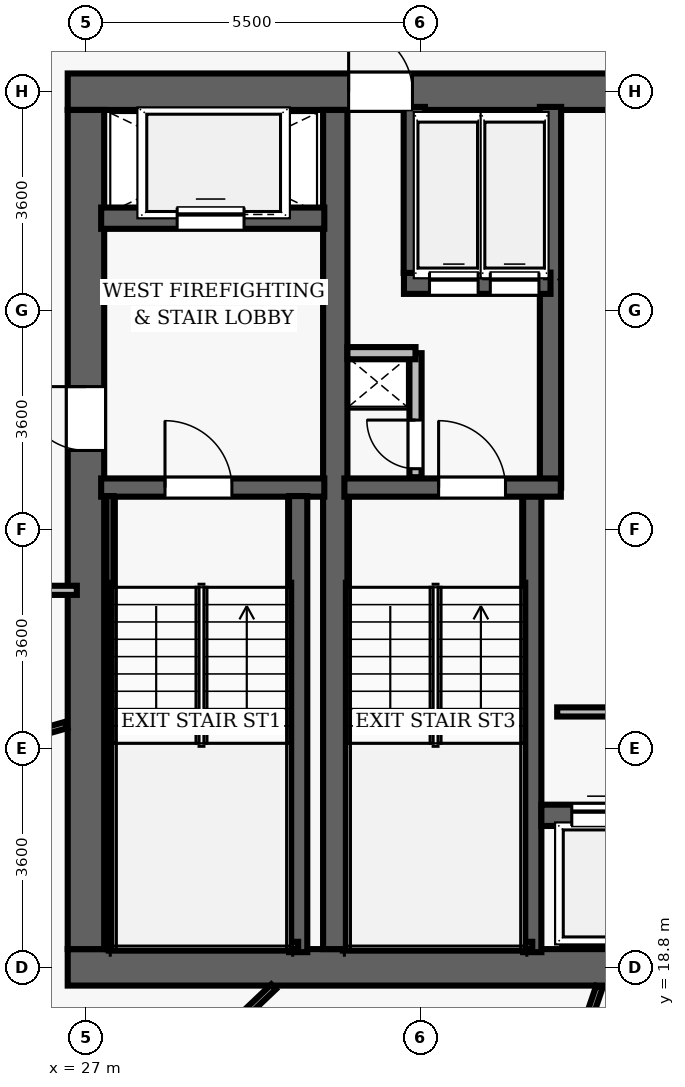
"""IFC4 building model, lengths in metres.
Left out: names, types, materials, properties, quantities, classifications, styles, units other than length and angle.
Written with IfcOpenShell. Run it as: python <this file> out.ifc"""

import sys

from ifc_helpers import new_model, si_unit, direction, frame, frame_2d, origin, place, context, subcontext, project, spatial, rectangle, extrude, element, fill, save


model = new_model("IFC4")
c1 = context("Model", 3, precision=1e-05, world=origin(), true_north=direction((0.0, 1.0)))
c2 = subcontext(c1, "Body", "Model", "MODEL_VIEW")
j1 = project(units=[si_unit("LENGTHUNIT", "METRE"), si_unit("PLANEANGLEUNIT", "RADIAN")], contexts=[c1])
p1 = place(None, origin())
s1 = spatial("IfcSite", under=j1, at=p1, CompositionType="ELEMENT")
p2 = place(p1, origin())
s2 = spatial("IfcBuilding", under=s1, at=p2, CompositionType="ELEMENT")
p3 = place(p2, frame((0.0, 0.0, 120.3)))
s3 = spatial("IfcBuildingStorey", under=s2, at=p3, CompositionType="ELEMENT", Elevation=120.3)
p4 = place(p3, frame((26.7, 18.8, 0.0), z_axis=(0.0, 0.0, 1.0), x_axis=(1.0, 0.0, 0.0)))
e1 = element("IfcWall", 1, at=p4, inside=s3, PredefinedType="SHEAR", context=c2, shape_type="SweptSolid", body=[
    extrude(rectangle(XDim=22.6, YDim=0.6, at=frame_2d((11.3, 0.0))), origin(), (0.0, 0.0, 1.0), 3.5),
])
p5 = place(p4, frame((14.52, 0.0, 0.0)))
e2 = element("IfcOpeningElement", 2, at=p5, cuts=e1, PredefinedType="OPENING", context=c2, shape_type="SweptSolid", body=[
    extrude(rectangle(XDim=1.05, YDim=2.15, at=frame_2d((0.525, 1.075))), frame((0.0, 0.31, 0.0), z_axis=(0.0, -1.0, 0.0), x_axis=(1.0, 0.0, 0.0)), (0.0, 0.0, 1.0), 0.62),
])
p6 = place(p3, frame((26.7, 33.2, 0.0), z_axis=(0.0, 0.0, 1.0), x_axis=(1.0, 0.0, 0.0)))
e3 = element("IfcWall", 3, at=p6, inside=s3, PredefinedType="SHEAR", context=c2, shape_type="SweptSolid", body=[
    extrude(rectangle(XDim=22.6, YDim=0.6, at=frame_2d((11.3, 0.0))), origin(), (0.0, 0.0, 1.0), 3.5),
])
p7 = place(p6, frame((4.62, 0.0, 0.0)))
e4 = element("IfcOpeningElement", 4, at=p7, cuts=e3, PredefinedType="OPENING", context=c2, shape_type="SweptSolid", body=[
    extrude(rectangle(XDim=1.05, YDim=2.15, at=frame_2d((0.525, 1.075))), frame((0.0, 0.31, 0.0), z_axis=(0.0, -1.0, 0.0), x_axis=(1.0, 0.0, 0.0)), (0.0, 0.0, 1.0), 0.62),
])
p8 = place(p6, frame((14.52, 0.0, 0.0)))
e5 = element("IfcOpeningElement", 5, at=p8, cuts=e3, PredefinedType="OPENING", context=c2, shape_type="SweptSolid", body=[
    extrude(rectangle(XDim=1.05, YDim=2.15, at=frame_2d((0.525, 1.075))), frame((0.0, 0.31, 0.0), z_axis=(0.0, -1.0, 0.0), x_axis=(1.0, 0.0, 0.0)), (0.0, 0.0, 1.0), 0.62),
])
p9 = place(p3, frame((27.0, 19.1, 0.0), z_axis=(0.0, 0.0, 1.0), x_axis=(0.0, 1.0, 0.0)))
e6 = element("IfcWall", 6, at=p9, inside=s3, PredefinedType="SHEAR", context=c2, shape_type="SweptSolid", body=[
    extrude(rectangle(XDim=13.8, YDim=0.6, at=frame_2d((6.9, 0.0))), origin(), (0.0, 0.0, 1.0), 3.5),
])
p10 = place(p9, frame((8.2, 0.0, 0.0)))
e7 = element("IfcOpeningElement", 7, at=p10, cuts=e6, PredefinedType="OPENING", context=c2, shape_type="SweptSolid", body=[
    extrude(rectangle(XDim=1.05, YDim=2.15, at=frame_2d((0.525, 1.075))), frame((0.0, 0.31, 0.0), z_axis=(0.0, -1.0, 0.0), x_axis=(1.0, 0.0, 0.0)), (0.0, 0.0, 1.0), 0.62),
])
p11 = place(p3, frame((31.1, 19.1, 0.0), z_axis=(0.0, 0.0, 1.0), x_axis=(0.0, 1.0, 0.0)))
e8 = element("IfcWall", 8, at=p11, inside=s3, PredefinedType="SHEAR", context=c2, shape_type="SweptSolid", body=[
    extrude(rectangle(XDim=13.8, YDim=0.4, at=frame_2d((6.9, 0.0))), origin(), (0.0, 0.0, 1.0), 3.5),
])
p12 = place(p3, frame((27.25, 26.69, 0.0), z_axis=(0.0, 0.0, 1.0), x_axis=(1.0, 0.0, 0.0)))
e9 = element("IfcWall", 9, at=p12, inside=s3, PredefinedType="SHEAR", context=c2, shape_type="SweptSolid", body=[
    extrude(rectangle(XDim=3.67, YDim=0.3, at=frame_2d((1.835, 0.0))), origin(), (0.0, 0.0, 1.0), 3.5),
])
p13 = place(p12, frame((1.05, 0.0, 0.0)))
e10 = element("IfcOpeningElement", 10, at=p13, cuts=e9, PredefinedType="OPENING", context=c2, shape_type="SweptSolid", body=[
    extrude(rectangle(XDim=1.1, YDim=2.15, at=frame_2d((0.55, 1.075))), frame((0.0, 0.16, 0.0), z_axis=(0.0, -1.0, 0.0), x_axis=(1.0, 0.0, 0.0)), (0.0, 0.0, 1.0), 0.32),
])
p14 = place(p3, frame((30.49, 19.05, 0.0), z_axis=(0.0, 0.0, 1.0), x_axis=(0.0, 1.0, 0.0)))
e11 = element("IfcWall", 11, at=p14, inside=s3, PredefinedType="SHEAR", context=c2, shape_type="SweptSolid", body=[
    extrude(rectangle(XDim=7.5, YDim=0.3, at=frame_2d((3.75, 0.0))), origin(), (0.0, 0.0, 1.0), 3.5),
])
p15 = place(p3, frame((27.395, 19.1, 0.0), z_axis=(0.0, 0.0, 1.0), x_axis=(0.0, 1.0, 0.0)))
e12 = element("IfcWall", 12, at=p15, inside=s3, PredefinedType="SHEAR", context=c2, shape_type="SweptSolid", body=[
    extrude(rectangle(XDim=7.45, YDim=0.12, at=frame_2d((3.725, 0.0))), origin(), (0.0, 0.0, 1.0), 3.5),
])
p16 = place(p3, frame((27.395, 19.16, 0.0), z_axis=(0.0, 0.0, 1.0), x_axis=(1.0, 0.0, 0.0)))
e13 = element("IfcWall", 13, at=p16, inside=s3, PredefinedType="SHEAR", context=c2, shape_type="SweptSolid", body=[
    extrude(rectangle(XDim=3.095, YDim=0.12, at=frame_2d((1.547, 0.0))), origin(), (0.0, 0.0, 1.0), 3.5),
])
p17 = place(p3, frame((27.25, 31.12, 0.0), z_axis=(0.0, 0.0, 1.0), x_axis=(1.0, 0.0, 0.0)))
e14 = element("IfcWall", 14, at=p17, inside=s3, PredefinedType="SHEAR", context=c2, shape_type="SweptSolid", body=[
    extrude(rectangle(XDim=3.67, YDim=0.35, at=frame_2d((1.835, 0.0))), origin(), (0.0, 0.0, 1.0), 2.675),
])
p18 = place(p17, frame((1.25, 0.0, 0.0)))
e15 = element("IfcOpeningElement", 15, at=p18, cuts=e14, PredefinedType="OPENING", context=c2, shape_type="SweptSolid", body=[
    extrude(rectangle(XDim=1.1, YDim=2.15, at=frame_2d((0.55, 1.075))), frame((0.0, 0.185, 0.0), z_axis=(0.0, -1.0, 0.0), x_axis=(1.0, 0.0, 0.0)), (0.0, 0.0, 1.0), 0.37),
])
p19 = place(p3, frame((34.34, 19.05, 0.0), z_axis=(0.0, 0.0, 1.0), x_axis=(0.0, 1.0, 0.0)))
e16 = element("IfcWall", 16, at=p19, inside=s3, PredefinedType="SHEAR", context=c2, shape_type="SweptSolid", body=[
    extrude(rectangle(XDim=7.5, YDim=0.3, at=frame_2d((3.75, 0.0))), origin(), (0.0, 0.0, 1.0), 3.5),
])
p20 = place(p3, frame((34.64, 26.69, 0.0), z_axis=(0.0, 0.0, 1.0), x_axis=(0.0, 1.0, 0.0)))
e17 = element("IfcWall", 17, at=p20, inside=s3, PredefinedType="SHEAR", context=c2, shape_type="SweptSolid", body=[
    extrude(rectangle(XDim=6.26, YDim=0.35, at=frame_2d((3.13, 0.0))), origin(), (0.0, 0.0, 1.0), 3.5),
])
p21 = place(p3, frame((31.25, 26.69, 0.0), z_axis=(0.0, 0.0, 1.0), x_axis=(1.0, 0.0, 0.0)))
e18 = element("IfcWall", 18, at=p21, inside=s3, PredefinedType="SHEAR", context=c2, shape_type="SweptSolid", body=[
    extrude(rectangle(XDim=3.56, YDim=0.3, at=frame_2d((1.78, 0.0))), origin(), (0.0, 0.0, 1.0), 3.5),
])
p22 = place(p21, frame((1.55, 0.0, 0.0)))
e19 = element("IfcOpeningElement", 19, at=p22, cuts=e18, PredefinedType="OPENING", context=c2, shape_type="SweptSolid", body=[
    extrude(rectangle(XDim=1.1, YDim=2.15, at=frame_2d((0.55, 1.075))), frame((0.0, 0.16, 0.0), z_axis=(0.0, -1.0, 0.0), x_axis=(1.0, 0.0, 0.0)), (0.0, 0.0, 1.0), 0.32),
])
p23 = place(p3, frame((31.3, 19.16, 0.0), z_axis=(0.0, 0.0, 1.0), x_axis=(1.0, 0.0, 0.0)))
e20 = element("IfcWall", 20, at=p23, inside=s3, PredefinedType="SHEAR", context=c2, shape_type="SweptSolid", body=[
    extrude(rectangle(XDim=3.04, YDim=0.12, at=frame_2d((1.52, 0.0))), origin(), (0.0, 0.0, 1.0), 3.5),
])
p24 = place(p3, frame((32.23, 30.05, 0.0), z_axis=(0.0, 0.0, 1.0), x_axis=(1.0, 0.0, 0.0)))
e21 = element("IfcWall", 21, at=p24, inside=s3, PredefinedType="SHEAR", context=c2, shape_type="SweptSolid", body=[
    extrude(rectangle(XDim=2.41, YDim=0.35, at=frame_2d((1.205, 0.0))), origin(), (0.0, 0.0, 1.0), 2.675),
])
p25 = place(p24, frame((0.42, 0.0, 0.0)))
e22 = element("IfcOpeningElement", 22, at=p25, cuts=e21, PredefinedType="OPENING", context=c2, shape_type="SweptSolid", body=[
    extrude(rectangle(XDim=0.8, YDim=2.15, at=frame_2d((0.4, 1.075))), frame((0.0, 0.185, 0.0), z_axis=(0.0, -1.0, 0.0), x_axis=(1.0, 0.0, 0.0)), (0.0, 0.0, 1.0), 0.37),
])
p26 = place(p24, frame((1.42, 0.0, 0.0)))
e23 = element("IfcOpeningElement", 23, at=p26, cuts=e21, PredefinedType="OPENING", context=c2, shape_type="SweptSolid", body=[
    extrude(rectangle(XDim=0.8, YDim=2.15, at=frame_2d((0.4, 1.075))), frame((0.0, 0.185, 0.0), z_axis=(0.0, -1.0, 0.0), x_axis=(1.0, 0.0, 0.0)), (0.0, 0.0, 1.0), 0.37),
])
p27 = place(p3, frame((32.4, 30.22, 0.0), z_axis=(0.0, 0.0, 1.0), x_axis=(0.0, 1.0, 0.0)))
e24 = element("IfcWall", 24, at=p27, inside=s3, PredefinedType="SHEAR", context=c2, shape_type="SweptSolid", body=[
    extrude(rectangle(XDim=2.73, YDim=0.35, at=frame_2d((1.365, 0.0))), origin(), (0.0, 0.0, 1.0), 2.675),
])
p28 = place(p3, frame((32.42, 26.86, 0.0), z_axis=(0.0, 0.0, 1.0), x_axis=(0.0, 1.0, 0.0)))
e25 = element("IfcWall", 25, at=p28, inside=s3, PredefinedType="PARTITIONING", context=c2, shape_type="SweptSolid", body=[
    extrude(rectangle(XDim=2.04, YDim=0.2, at=frame_2d((1.02, 0.0))), origin(), (0.0, 0.0, 1.0), 2.675),
])
p29 = place(p28, frame((0.14, 0.0, 0.0)))
e26 = element("IfcOpeningElement", 26, at=p29, cuts=e25, PredefinedType="OPENING", context=c2, shape_type="SweptSolid", body=[
    extrude(rectangle(XDim=0.8, YDim=2.05, at=frame_2d((0.4, 1.025))), frame((0.0, 0.11, 0.0), z_axis=(0.0, -1.0, 0.0), x_axis=(1.0, 0.0, 0.0)), (0.0, 0.0, 1.0), 0.22),
])
p30 = place(p3, frame((31.3, 28.9, 0.0), z_axis=(0.0, 0.0, 1.0), x_axis=(1.0, 0.0, 0.0)))
e27 = element("IfcWall", 27, at=p30, inside=s3, PredefinedType="PARTITIONING", context=c2, shape_type="SweptSolid", body=[
    extrude(rectangle(XDim=1.12, YDim=0.2, at=frame_2d((0.56, 0.0))), origin(), (0.0, 0.0, 1.0), 2.675),
])
p31 = place(p3, frame((34.49, 21.3, 0.0), z_axis=(0.0, 0.0, 1.0), x_axis=(1.0, 0.0, 0.0)))
e28 = element("IfcWall", 28, at=p31, inside=s3, PredefinedType="SHEAR", context=c2, shape_type="SweptSolid", body=[
    extrude(rectangle(XDim=6.68, YDim=0.35, at=frame_2d((3.34, 0.0))), origin(), (0.0, 0.0, 1.0), 2.675),
])
p32 = place(p31, frame((0.5, 0.0, 0.0)))
e29 = element("IfcOpeningElement", 29, at=p32, cuts=e28, PredefinedType="OPENING", context=c2, shape_type="SweptSolid", body=[
    extrude(rectangle(XDim=0.9, YDim=2.15, at=frame_2d((0.45, 1.075))), frame((0.0, 0.185, 0.0), z_axis=(0.0, -1.0, 0.0), x_axis=(1.0, 0.0, 0.0)), (0.0, 0.0, 1.0), 0.37),
])
p33 = place(p31, frame((2.58, 0.0, 0.0)))
e30 = element("IfcOpeningElement", 30, at=p33, cuts=e28, PredefinedType="OPENING", context=c2, shape_type="SweptSolid", body=[
    extrude(rectangle(XDim=0.9, YDim=2.15, at=frame_2d((0.45, 1.075))), frame((0.0, 0.185, 0.0), z_axis=(0.0, -1.0, 0.0), x_axis=(1.0, 0.0, 0.0)), (0.0, 0.0, 1.0), 0.37),
])
p34 = place(p31, frame((4.66, 0.0, 0.0)))
e31 = element("IfcOpeningElement", 31, at=p34, cuts=e28, PredefinedType="OPENING", context=c2, shape_type="SweptSolid", body=[
    extrude(rectangle(XDim=0.9, YDim=2.15, at=frame_2d((0.45, 1.075))), frame((0.0, 0.185, 0.0), z_axis=(0.0, -1.0, 0.0), x_axis=(1.0, 0.0, 0.0)), (0.0, 0.0, 1.0), 0.37),
])
p35 = place(p3, frame((34.75, 23.0, 0.0), z_axis=(0.0, 0.0, 1.0), x_axis=(1.0, 0.0, 0.0)))
e32 = element("IfcWall", 32, at=p35, inside=s3, PredefinedType="PARTITIONING", context=c2, shape_type="SweptSolid", body=[
    extrude(rectangle(XDim=6.25, YDim=0.15, at=frame_2d((3.125, 0.0))), origin(), (0.0, 0.0, 1.0), 2.675),
])
p36 = place(p3, frame((14.5, 25.0, 0.0), z_axis=(0.0, 0.0, 1.0), x_axis=(1.0, 0.0, 0.0)))
e33 = element("IfcWall", 33, at=p36, inside=s3, PredefinedType="PARTITIONING", context=c2, shape_type="SweptSolid", body=[
    extrude(rectangle(XDim=12.35, YDim=0.15, at=frame_2d((6.175, 0.0))), origin(), (0.0, 0.0, 1.0), 2.675),
])
p37 = place(p36, frame((8.788, 0.0, 0.0)))
e34 = element("IfcOpeningElement", 34, at=p37, cuts=e33, PredefinedType="OPENING", context=c2, shape_type="SweptSolid", body=[
    extrude(rectangle(XDim=0.95, YDim=2.15, at=frame_2d((0.475, 1.075))), frame((0.0, 0.085, 0.0), z_axis=(0.0, -1.0, 0.0), x_axis=(1.0, 0.0, 0.0)), (0.0, 0.0, 1.0), 0.17),
])
p38 = place(p3, frame((26.68, 22.787, 0.0), z_axis=(0.0, 0.0, 1.0), x_axis=(-0.961996623754, -0.273061340883, 0.0)))
e35 = element("IfcWall", 35, at=p38, inside=s3, PredefinedType="PARTITIONING", context=c2, shape_type="SweptSolid", body=[
    extrude(rectangle(XDim=14.457, YDim=0.11, at=frame_2d((7.229, 0.0))), origin(), (0.0, 0.0, 1.0), 2.675),
])
p39 = place(p3, frame((30.086, 18.48, 0.0), z_axis=(0.0, 0.0, 1.0), x_axis=(-0.724915865707, -0.688837417426, 0.0)))
e36 = element("IfcWall", 36, at=p39, inside=s3, PredefinedType="PARTITIONING", context=c2, shape_type="SweptSolid", body=[
    extrude(rectangle(XDim=12.911, YDim=0.11, at=frame_2d((6.456, 0.0))), origin(), (0.0, 0.0, 1.0), 2.675),
])
p40 = place(p3, frame((35.445, 18.48, 0.0), z_axis=(0.0, 0.0, 1.0), x_axis=(-0.321757380661, -0.946822152249, 0.0)))
e37 = element("IfcWall", 37, at=p40, inside=s3, PredefinedType="PARTITIONING", context=c2, shape_type="SweptSolid", body=[
    extrude(rectangle(XDim=14.966, YDim=0.11, at=frame_2d((7.483, 0.0))), origin(), (0.0, 0.0, 1.0), 2.675),
])
p41 = place(p13, origin())
e38 = element("IfcDoor", 38, at=p41, inside=s3, OperationType="SINGLE_SWING_LEFT", PredefinedType="DOOR", context=c2, shape_type="SweptSolid", body=[
    extrude(rectangle(XDim=1.1, YDim=2.15, at=frame_2d((0.55, 1.075))), frame((0.0, 0.025, 0.0), z_axis=(0.0, -1.0, 0.0), x_axis=(1.0, 0.0, 0.0)), (0.0, 0.0, 1.0), 0.05),
])
fill(e10, e38)
p42 = place(p10, origin())
e39 = element("IfcDoor", 39, at=p42, inside=s3, OperationType="SINGLE_SWING_RIGHT", PredefinedType="DOOR", context=c2, shape_type="SweptSolid", body=[
    extrude(rectangle(XDim=1.05, YDim=2.15, at=frame_2d((0.525, 1.075))), frame((0.0, 0.025, 0.0), z_axis=(0.0, -1.0, 0.0), x_axis=(1.0, 0.0, 0.0)), (0.0, 0.0, 1.0), 0.05),
])
fill(e7, e39)
p43 = place(p22, origin())
e40 = element("IfcDoor", 40, at=p43, inside=s3, OperationType="SINGLE_SWING_LEFT", PredefinedType="DOOR", context=c2, shape_type="SweptSolid", body=[
    extrude(rectangle(XDim=1.1, YDim=2.15, at=frame_2d((0.55, 1.075))), frame((0.0, 0.025, 0.0), z_axis=(0.0, -1.0, 0.0), x_axis=(1.0, 0.0, 0.0)), (0.0, 0.0, 1.0), 0.05),
])
fill(e19, e40)
p44 = place(p29, origin())
e41 = element("IfcDoor", 41, at=p44, inside=s3, OperationType="SINGLE_SWING_RIGHT", PredefinedType="DOOR", context=c2, shape_type="SweptSolid", body=[
    extrude(rectangle(XDim=0.8, YDim=2.05, at=frame_2d((0.4, 1.025))), frame((0.0, 0.025, 0.0), z_axis=(0.0, -1.0, 0.0), x_axis=(1.0, 0.0, 0.0)), (0.0, 0.0, 1.0), 0.05),
])
fill(e26, e41)
p45 = place(p7, origin())
e42 = element("IfcDoor", 42, at=p45, inside=s3, OperationType="SINGLE_SWING_LEFT", PredefinedType="DOOR", context=c2, shape_type="SweptSolid", body=[
    extrude(rectangle(XDim=1.05, YDim=2.15, at=frame_2d((0.525, 1.075))), frame((0.0, 0.025, 0.0), z_axis=(0.0, -1.0, 0.0), x_axis=(1.0, 0.0, 0.0)), (0.0, 0.0, 1.0), 0.05),
])
fill(e4, e42)
p46 = place(p32, origin())
e43 = element("IfcDoor", 43, at=p46, inside=s3, OperationType="SLIDING_TO_LEFT", PredefinedType="DOOR", context=c2, shape_type="SweptSolid", body=[
    extrude(rectangle(XDim=0.9, YDim=2.15, at=frame_2d((0.45, 1.075))), frame((0.0, 0.025, 0.0), z_axis=(0.0, -1.0, 0.0), x_axis=(1.0, 0.0, 0.0)), (0.0, 0.0, 1.0), 0.05),
])
fill(e29, e43)
p47 = place(p18, origin())
e44 = element("IfcDoor", 44, at=p47, inside=s3, OperationType="SLIDING_TO_LEFT", PredefinedType="DOOR", context=c2, shape_type="SweptSolid", body=[
    extrude(rectangle(XDim=1.1, YDim=2.15, at=frame_2d((0.55, 1.075))), frame((0.0, 0.025, 0.0), z_axis=(0.0, -1.0, 0.0), x_axis=(1.0, 0.0, 0.0)), (0.0, 0.0, 1.0), 0.05),
])
fill(e15, e44)
p48 = place(p25, origin())
e45 = element("IfcDoor", 45, at=p48, inside=s3, OperationType="SLIDING_TO_LEFT", PredefinedType="DOOR", context=c2, shape_type="SweptSolid", body=[
    extrude(rectangle(XDim=0.8, YDim=2.15, at=frame_2d((0.4, 1.075))), frame((0.0, 0.025, 0.0), z_axis=(0.0, -1.0, 0.0), x_axis=(1.0, 0.0, 0.0)), (0.0, 0.0, 1.0), 0.05),
])
fill(e22, e45)
p49 = place(p26, origin())
e46 = element("IfcDoor", 46, at=p49, inside=s3, OperationType="SLIDING_TO_LEFT", PredefinedType="DOOR", context=c2, shape_type="SweptSolid", body=[
    extrude(rectangle(XDim=0.8, YDim=2.15, at=frame_2d((0.4, 1.075))), frame((0.0, 0.025, 0.0), z_axis=(0.0, -1.0, 0.0), x_axis=(1.0, 0.0, 0.0)), (0.0, 0.0, 1.0), 0.05),
])
fill(e23, e46)
save(model, sys.argv[1])
